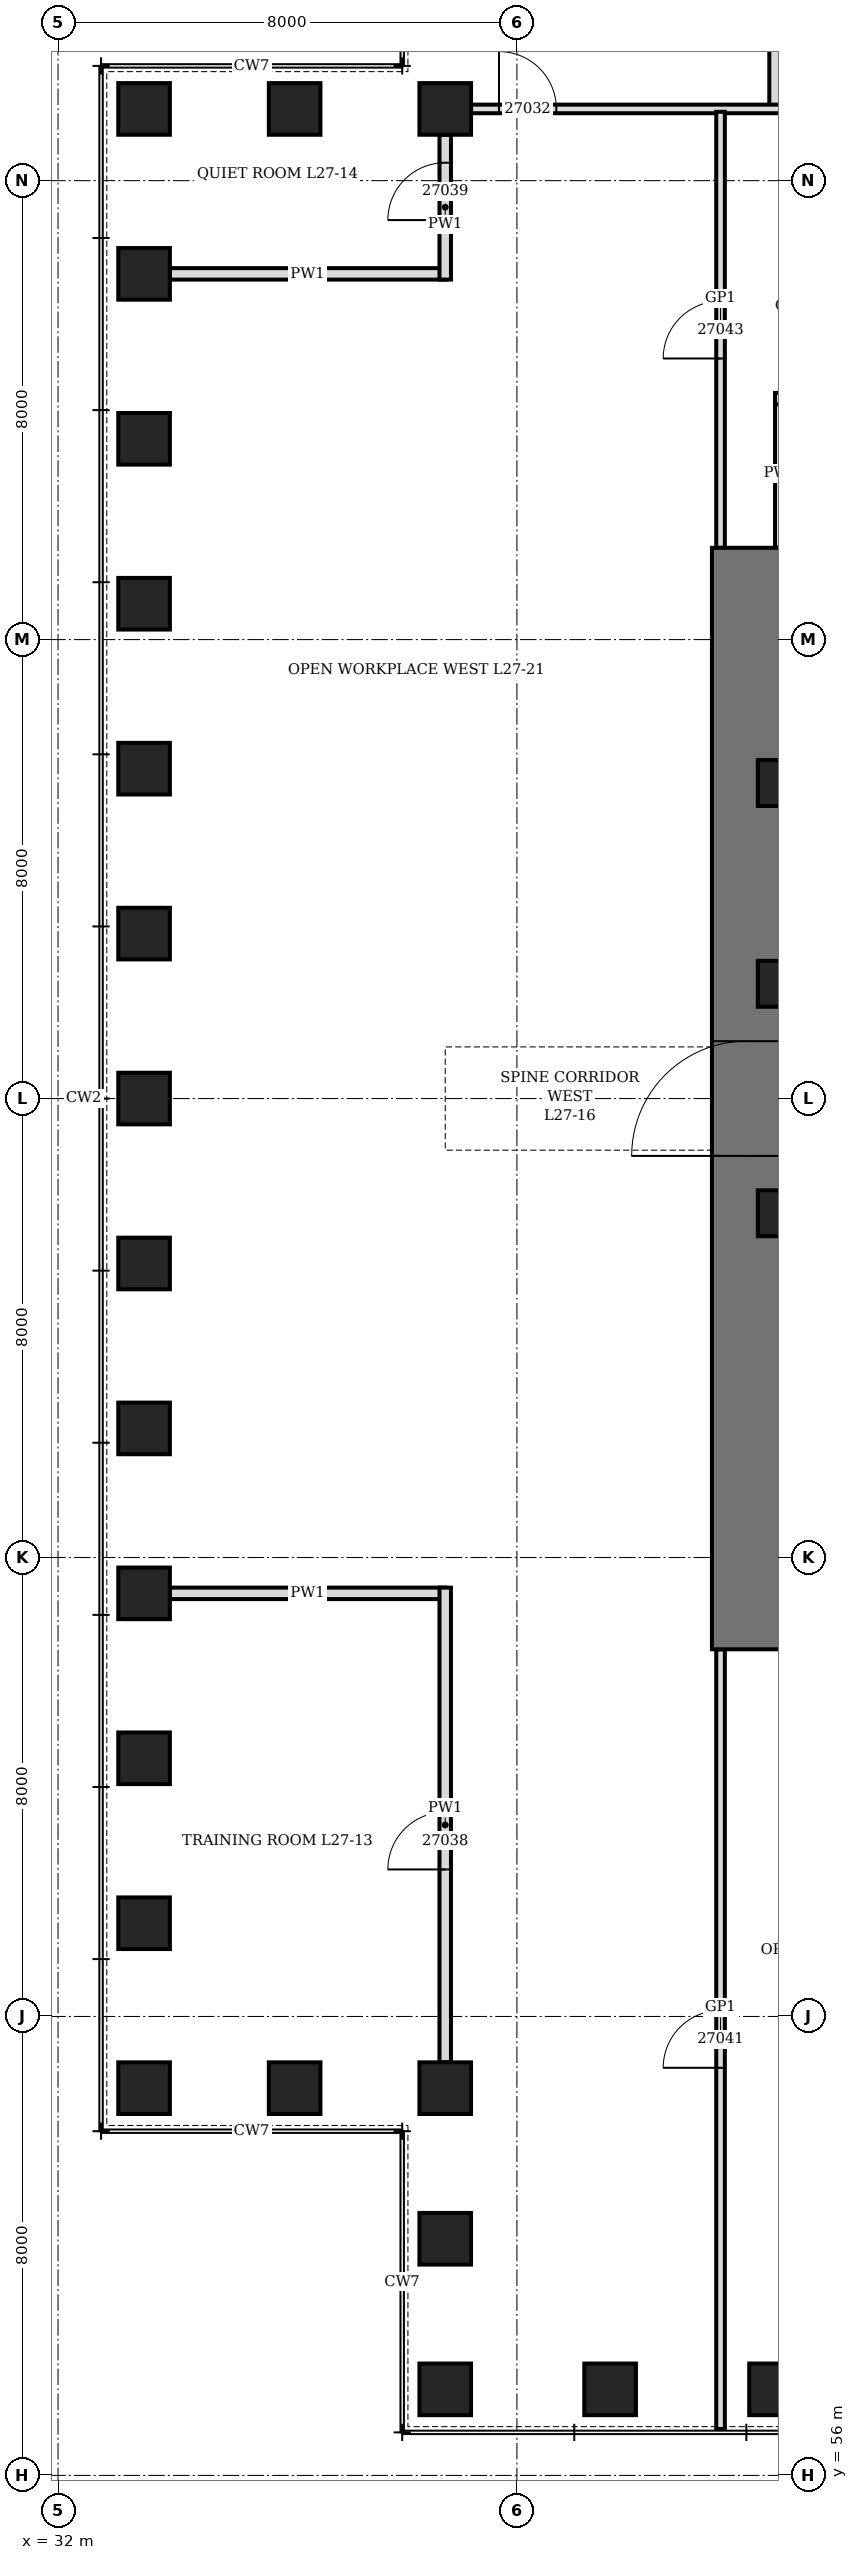
"""IFC4 building model, lengths in metres.
Left out: names, types, materials, properties, quantities, classifications, styles, units other than length and angle.
Written with IfcOpenShell. Run it as: python <this file> out.ifc"""

import sys

from ifc_helpers import new_model, si_unit, direction, frame, frame_2d, origin, origin_2d, place, context, subcontext, project, spatial, rectangle, hollow_rectangle, extrude, element, fill, save


model = new_model("IFC4")
c1 = context("Model", 3, precision=1e-05, world=origin(), true_north=direction((0.0, 1.0)))
c2 = subcontext(c1, "Body", "Model", "MODEL_VIEW")
j1 = project(units=[si_unit("LENGTHUNIT", "METRE"), si_unit("PLANEANGLEUNIT", "RADIAN")], contexts=[c1])
p1 = place(None, origin())
s1 = spatial("IfcSite", under=j1, at=p1, CompositionType="ELEMENT")
p2 = place(p1, origin())
s2 = spatial("IfcBuilding", under=s1, at=p2, CompositionType="ELEMENT")
p3 = place(p2, frame((0.0, 0.0, 124.9)))
s3 = spatial("IfcBuildingStorey", under=s2, at=p3, CompositionType="ELEMENT", Elevation=124.9)
for number, where, z_axis, x_axis in (
    (1, (38.75, 57.5, 0.0), (0.0, 0.0, 1.0), (1.0, 0.0, 0.0)),
    (2, (41.625, 57.5, 0.0), (0.0, 0.0, 1.0), (1.0, 0.0, 0.0)),
    (3, (44.5, 57.5, 0.0), (0.0, 0.0, 1.0), (1.0, 0.0, 0.0)),
    (4, (38.75, 97.25, 0.0), (0.0, 0.0, 1.0), (1.0, 0.0, 0.0)),
    (5, (36.125, 97.25, 0.0), (0.0, 0.0, 1.0), (1.0, 0.0, 0.0)),
    (6, (33.5, 97.25, 0.0), (0.0, 0.0, 1.0), (0.0, 1.0, 0.0)),
    (7, (33.5, 94.375, 0.0), (0.0, 0.0, 1.0), (0.0, 1.0, 0.0)),
    (8, (33.5, 91.5, 0.0), (0.0, 0.0, 1.0), (0.0, 1.0, 0.0)),
    (9, (33.5, 88.625, 0.0), (0.0, 0.0, 1.0), (0.0, 1.0, 0.0)),
    (10, (33.5, 85.75, 0.0), (0.0, 0.0, 1.0), (0.0, 1.0, 0.0)),
    (11, (33.5, 82.875, 0.0), (0.0, 0.0, 1.0), (0.0, 1.0, 0.0)),
    (12, (33.5, 80.0, 0.0), (0.0, 0.0, 1.0), (0.0, 1.0, 0.0)),
    (13, (33.5, 77.125, 0.0), (0.0, 0.0, 1.0), (0.0, 1.0, 0.0)),
    (14, (33.5, 74.25, 0.0), (0.0, 0.0, 1.0), (0.0, 1.0, 0.0)),
    (15, (33.5, 71.375, 0.0), (0.0, 0.0, 1.0), (0.0, 1.0, 0.0)),
    (16, (33.5, 68.5, 0.0), (0.0, 0.0, 1.0), (0.0, 1.0, 0.0)),
    (17, (33.5, 65.625, 0.0), (0.0, 0.0, 1.0), (0.0, 1.0, 0.0)),
    (18, (33.5, 62.75, 0.0), (0.0, 0.0, 1.0), (1.0, 0.0, 0.0)),
    (19, (36.125, 62.75, 0.0), (0.0, 0.0, 1.0), (1.0, 0.0, 0.0)),
    (20, (38.75, 62.75, 0.0), (0.0, 0.0, 1.0), (0.0, 1.0, 0.0)),
    (21, (38.75, 60.125, 0.0), (0.0, 0.0, 1.0), (0.0, 1.0, 0.0)),
):
    element("IfcColumn", number, at=place(p3, frame(where, z_axis=z_axis, x_axis=x_axis)), inside=s3, PredefinedType="COLUMN", context=c2, shape_type="SweptSolid", body=[
        extrude(hollow_rectangle(XDim=0.9, YDim=0.9, WallThickness=0.15, at=origin_2d()), origin(), (0.0, 0.0, 1.0), 4.2),
    ])
p4 = place(p3, frame((44.0, 70.4, 0.0), z_axis=(0.0, 0.0, 1.0), x_axis=(0.0, 1.0, 0.0)))
e22 = element("IfcWall", 22, at=p4, inside=s3, PredefinedType="SHEAR", context=c2, shape_type="SweptSolid", body=[
    extrude(rectangle(XDim=19.2, YDim=1.2, at=frame_2d((9.6, 0.0))), origin(), (0.0, 0.0, 1.0), 4.2),
])
p5 = place(p4, frame((8.6, 0.0, 0.0)))
e23 = element("IfcOpeningElement", 23, at=p5, cuts=e22, PredefinedType="OPENING", context=c2, shape_type="SweptSolid", body=[
    extrude(rectangle(XDim=2.0, YDim=2.4, at=frame_2d((1.0, 1.2))), frame((0.0, 0.61, 0.0), z_axis=(0.0, -1.0, 0.0), x_axis=(1.0, 0.0, 0.0)), (0.0, 0.0, 1.0), 1.22),
])
for number, where, z_axis, x_axis in (
    (24, (44.6, 78.0, 0.0), (0.0, 0.0, 1.0), (1.0, 0.0, 0.0)),
    (25, (44.6, 82.0, 0.0), (0.0, 0.0, 1.0), (1.0, 0.0, 0.0)),
    (26, (44.6, 85.5, 0.0), (0.0, 0.0, 1.0), (1.0, 0.0, 0.0)),
):
    element("IfcColumn", number, at=place(p3, frame(where, z_axis=z_axis, x_axis=x_axis)), inside=s3, PredefinedType="COLUMN", context=c2, shape_type="SweptSolid", body=[
        extrude(hollow_rectangle(XDim=0.8, YDim=0.8, WallThickness=0.1, at=origin_2d()), origin(), (0.0, 0.0, 1.0), 4.2),
    ])
p6 = place(p3, frame((44.5, 97.25, 0.0), z_axis=(0.0, 0.0, 1.0), x_axis=(0.0, 1.0, 0.0)))
e27 = element("IfcWall", 27, at=p6, inside=s3, PredefinedType="PARTITIONING", context=c2, shape_type="SweptSolid", body=[
    extrude(rectangle(XDim=4.8, YDim=0.2, at=frame_2d((2.4, 0.0))), origin(), (0.0, 0.0, 1.0), 2.74),
])
for number, where, z_axis, x_axis in (
    (28, (33.95, 71.375, 0.0), (0.0, 0.0, 1.0), (1.0, 0.0, 0.0)),
    (29, (33.95, 94.375, 0.0), (0.0, 0.0, 1.0), (1.0, 0.0, 0.0)),
):
    element("IfcWall", number, at=place(p3, frame(where, z_axis=z_axis, x_axis=x_axis)), inside=s3, PredefinedType="PARTITIONING", context=c2, shape_type="SweptSolid", body=[
        extrude(rectangle(XDim=4.8, YDim=0.2, at=frame_2d((2.4, 0.0))), origin(), (0.0, 0.0, 1.0), 3.428),
    ])
p7 = place(p3, frame((44.6, 89.6, 0.0), z_axis=(0.0, 0.0, 1.0), x_axis=(0.0, 1.0, 0.0)))
e30 = element("IfcWall", 30, at=p7, inside=s3, PredefinedType="PARTITIONING", context=c2, shape_type="SweptSolid", body=[
    extrude(rectangle(XDim=2.6, YDim=0.2, at=frame_2d((1.3, 0.0))), origin(), (0.0, 0.0, 1.0), 2.74),
])
p8 = place(p3, frame((44.5, 92.2, 0.0), z_axis=(0.0, 0.0, 1.0), x_axis=(1.0, 0.0, 0.0)))
e31 = element("IfcWall", 31, at=p8, inside=s3, PredefinedType="PARTITIONING", context=c2, shape_type="SweptSolid", body=[
    extrude(rectangle(XDim=6.4, YDim=0.2, at=frame_2d((3.2, 0.0))), origin(), (0.0, 0.0, 1.0), 4.04),
])
p9 = place(p8, frame((3.175, 0.0, 0.0)))
e32 = element("IfcOpeningElement", 32, at=p9, cuts=e31, PredefinedType="OPENING", context=c2, shape_type="SweptSolid", body=[
    extrude(rectangle(XDim=1.0, YDim=2.1, at=frame_2d((0.5, 1.05))), frame((0.0, 0.11, 0.0), z_axis=(0.0, -1.0, 0.0), x_axis=(1.0, 0.0, 0.0)), (0.0, 0.0, 1.0), 0.22),
])
p10 = place(p3, frame((39.2, 97.25, 0.0), z_axis=(0.0, 0.0, 1.0), x_axis=(1.0, 0.0, 0.0)))
e33 = element("IfcWall", 33, at=p10, inside=s3, PredefinedType="PARTITIONING", context=c2, shape_type="SweptSolid", body=[
    extrude(rectangle(XDim=22.65, YDim=0.15, at=frame_2d((11.325, 0.0))), origin(), (0.0, 0.0, 1.0), 4.04),
])
p11 = place(p10, frame((0.488, 0.0, 0.0)))
e34 = element("IfcOpeningElement", 34, at=p11, cuts=e33, PredefinedType="OPENING", context=c2, shape_type="SweptSolid", body=[
    extrude(rectangle(XDim=1.0, YDim=2.4, at=frame_2d((0.5, 1.2))), frame((0.0, 0.085, 0.0), z_axis=(0.0, -1.0, 0.0), x_axis=(1.0, 0.0, 0.0)), (0.0, 0.0, 1.0), 0.17),
])
p12 = place(p10, frame((6.238, 0.0, 0.0)))
e35 = element("IfcOpeningElement", 35, at=p12, cuts=e33, PredefinedType="OPENING", context=c2, shape_type="SweptSolid", body=[
    extrude(rectangle(XDim=1.0, YDim=2.1, at=frame_2d((0.5, 1.05))), frame((0.0, 0.085, 0.0), z_axis=(0.0, -1.0, 0.0), x_axis=(1.0, 0.0, 0.0)), (0.0, 0.0, 1.0), 0.17),
])
p13 = place(p10, frame((11.988, 0.0, 0.0)))
e36 = element("IfcOpeningElement", 36, at=p13, cuts=e33, PredefinedType="OPENING", context=c2, shape_type="SweptSolid", body=[
    extrude(rectangle(XDim=1.0, YDim=2.1, at=frame_2d((0.5, 1.05))), frame((0.0, 0.085, 0.0), z_axis=(0.0, -1.0, 0.0), x_axis=(1.0, 0.0, 0.0)), (0.0, 0.0, 1.0), 0.17),
])
p14 = place(p10, frame((17.738, 0.0, 0.0)))
e37 = element("IfcOpeningElement", 37, at=p14, cuts=e33, PredefinedType="OPENING", context=c2, shape_type="SweptSolid", body=[
    extrude(rectangle(XDim=1.0, YDim=2.1, at=frame_2d((0.5, 1.05))), frame((0.0, 0.085, 0.0), z_axis=(0.0, -1.0, 0.0), x_axis=(1.0, 0.0, 0.0)), (0.0, 0.0, 1.0), 0.17),
])
p15 = place(p3, frame((38.75, 63.2, 0.0), z_axis=(0.0, 0.0, 1.0), x_axis=(0.0, 1.0, 0.0)))
e38 = element("IfcWall", 38, at=p15, inside=s3, PredefinedType="PARTITIONING", context=c2, shape_type="SweptSolid", body=[
    extrude(rectangle(XDim=8.275, YDim=0.2, at=frame_2d((4.138, 0.0))), origin(), (0.0, 0.0, 1.0), 4.04),
])
p16 = place(p15, frame((3.363, 0.0, 0.0)))
e39 = element("IfcOpeningElement", 39, at=p16, cuts=e38, PredefinedType="OPENING", context=c2, shape_type="SweptSolid", body=[
    extrude(rectangle(XDim=1.0, YDim=2.1, at=frame_2d((0.5, 1.05))), frame((0.0, 0.11, 0.0), z_axis=(0.0, -1.0, 0.0), x_axis=(1.0, 0.0, 0.0)), (0.0, 0.0, 1.0), 0.22),
])
p17 = place(p3, frame((38.75, 94.275, 0.0), z_axis=(0.0, 0.0, 1.0), x_axis=(0.0, 1.0, 0.0)))
e40 = element("IfcWall", 40, at=p17, inside=s3, PredefinedType="PARTITIONING", context=c2, shape_type="SweptSolid", body=[
    extrude(rectangle(XDim=2.525, YDim=0.2, at=frame_2d((1.263, 0.0))), origin(), (0.0, 0.0, 1.0), 4.04),
])
p18 = place(p17, frame((1.038, 0.0, 0.0)))
e41 = element("IfcOpeningElement", 41, at=p18, cuts=e40, PredefinedType="OPENING", context=c2, shape_type="SweptSolid", body=[
    extrude(rectangle(XDim=1.0, YDim=2.1, at=frame_2d((0.5, 1.05))), frame((0.0, 0.11, 0.0), z_axis=(0.0, -1.0, 0.0), x_axis=(1.0, 0.0, 0.0)), (0.0, 0.0, 1.0), 0.22),
])
p19 = place(p3, frame((43.55, 56.81, 0.0), z_axis=(0.0, 0.0, 1.0), x_axis=(0.0, 1.0, 0.0)))
e42 = element("IfcWall", 42, at=p19, inside=s3, PredefinedType="PARTITIONING", context=c2, shape_type="SweptSolid", body=[
    extrude(rectangle(XDim=13.59, YDim=0.15, at=frame_2d((6.795, 0.0))), origin(), (0.0, 0.0, 1.0), 4.04),
])
p20 = place(p19, frame((6.295, 0.0, 0.0)))
e43 = element("IfcOpeningElement", 43, at=p20, cuts=e42, PredefinedType="OPENING", context=c2, shape_type="SweptSolid", body=[
    extrude(rectangle(XDim=1.0, YDim=2.4, at=frame_2d((0.5, 1.2))), frame((0.0, 0.085, 0.0), z_axis=(0.0, -1.0, 0.0), x_axis=(1.0, 0.0, 0.0)), (0.0, 0.0, 1.0), 0.17),
])
p21 = place(p3, frame((43.55, 89.6, 0.0), z_axis=(0.0, 0.0, 1.0), x_axis=(0.0, 1.0, 0.0)))
e44 = element("IfcWall", 44, at=p21, inside=s3, PredefinedType="PARTITIONING", context=c2, shape_type="SweptSolid", body=[
    extrude(rectangle(XDim=7.6, YDim=0.15, at=frame_2d((3.8, 0.0))), origin(), (0.0, 0.0, 1.0), 4.04),
])
p22 = place(p21, frame((3.3, 0.0, 0.0)))
e45 = element("IfcOpeningElement", 45, at=p22, cuts=e44, PredefinedType="OPENING", context=c2, shape_type="SweptSolid", body=[
    extrude(rectangle(XDim=1.0, YDim=2.4, at=frame_2d((0.5, 1.2))), frame((0.0, 0.085, 0.0), z_axis=(0.0, -1.0, 0.0), x_axis=(1.0, 0.0, 0.0)), (0.0, 0.0, 1.0), 0.17),
])
p23 = place(p5, origin())
e46 = element("IfcDoor", 46, at=p23, inside=s3, OperationType="DOUBLE_DOOR_SINGLE_SWING", PredefinedType="DOOR", context=c2, shape_type="SweptSolid", body=[
    extrude(rectangle(XDim=2.0, YDim=2.4, at=frame_2d((1.0, 1.2))), frame((0.0, 0.35, 0.0), z_axis=(0.0, -1.0, 0.0), x_axis=(1.0, 0.0, 0.0)), (0.0, 0.0, 1.0), 0.7),
])
fill(e23, e46)
p24 = place(p11, origin())
e47 = element("IfcDoor", 47, at=p24, inside=s3, OperationType="SINGLE_SWING_RIGHT", PredefinedType="DOOR", context=c2, shape_type="SweptSolid", body=[
    extrude(rectangle(XDim=1.0, YDim=2.4, at=frame_2d((0.5, 1.2))), frame((0.0, 0.075, 0.0), z_axis=(0.0, -1.0, 0.0), x_axis=(1.0, 0.0, 0.0)), (0.0, 0.0, 1.0), 0.149),
])
fill(e34, e47)
p25 = place(p16, origin())
e48 = element("IfcDoor", 48, at=p25, inside=s3, OperationType="SINGLE_SWING_LEFT", PredefinedType="DOOR", context=c2, shape_type="SweptSolid", body=[
    extrude(rectangle(XDim=1.0, YDim=2.1, at=frame_2d((0.5, 1.05))), frame((0.0, 0.1, 0.0), z_axis=(0.0, -1.0, 0.0), x_axis=(1.0, 0.0, 0.0)), (0.0, 0.0, 1.0), 0.199),
])
fill(e39, e48)
p26 = place(p18, origin())
e49 = element("IfcDoor", 49, at=p26, inside=s3, OperationType="SINGLE_SWING_LEFT", PredefinedType="DOOR", context=c2, shape_type="SweptSolid", body=[
    extrude(rectangle(XDim=1.0, YDim=2.1, at=frame_2d((0.5, 1.05))), frame((0.0, 0.1, 0.0), z_axis=(0.0, -1.0, 0.0), x_axis=(1.0, 0.0, 0.0)), (0.0, 0.0, 1.0), 0.199),
])
fill(e41, e49)
p27 = place(p20, origin())
e50 = element("IfcDoor", 50, at=p27, inside=s3, OperationType="SINGLE_SWING_RIGHT", PredefinedType="DOOR", context=c2, shape_type="SweptSolid", body=[
    extrude(rectangle(XDim=1.0, YDim=2.4, at=frame_2d((0.5, 1.2))), frame((0.0, 0.075, 0.0), z_axis=(0.0, -1.0, 0.0), x_axis=(1.0, 0.0, 0.0)), (0.0, 0.0, 1.0), 0.149),
])
fill(e43, e50)
p28 = place(p22, origin())
e51 = element("IfcDoor", 51, at=p28, inside=s3, OperationType="SINGLE_SWING_RIGHT", PredefinedType="DOOR", context=c2, shape_type="SweptSolid", body=[
    extrude(rectangle(XDim=1.0, YDim=2.4, at=frame_2d((0.5, 1.2))), frame((0.0, 0.075, 0.0), z_axis=(0.0, -1.0, 0.0), x_axis=(1.0, 0.0, 0.0)), (0.0, 0.0, 1.0), 0.149),
])
fill(e45, e51)
save(model, sys.argv[1])
